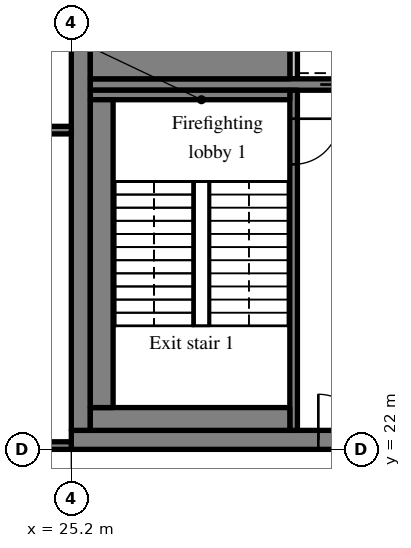
"""IFC4 building model, lengths in metres.
Left out: names, types, materials, properties, quantities, classifications, styles, units other than length and angle.
Written with IfcOpenShell. Run it as: python <this file> out.ifc"""

import sys

from ifc_helpers import new_model, si_unit, direction, frame, frame_2d, origin, place, context, subcontext, project, spatial, rectangle, extrude, source, transform, mapped, element, fill, save


model = new_model("IFC4")
c1 = context("Model", 3, precision=1e-05, world=origin(), true_north=direction((0.0, 1.0)))
c2 = subcontext(c1, "Body", "Model", "MODEL_VIEW")
j1 = project(units=[si_unit("LENGTHUNIT", "METRE"), si_unit("PLANEANGLEUNIT", "RADIAN")], contexts=[c1])
p1 = place(None, origin())
s1 = spatial("IfcSite", under=j1, at=p1, CompositionType="ELEMENT")
p2 = place(p1, origin())
s2 = spatial("IfcBuilding", under=s1, at=p2, CompositionType="ELEMENT")
p3 = place(p2, frame((0.0, 0.0, 309.7)))
s3 = spatial("IfcBuildingStorey", under=s2, at=p3, CompositionType="ELEMENT", Elevation=309.7)
m1 = source(origin(), c2, "Body", "SweptSolid", [
    extrude(rectangle(XDim=50.4, YDim=0.5, at=frame_2d((25.2, 0.0))), origin(), (0.0, 0.0, 1.0), 3.72),
])
p4 = place(p3, frame((25.2, 22.25, 0.0), z_axis=(0.0, 0.0, 1.0), x_axis=(1.0, 0.0, 0.0)))
e1 = element("IfcWall", 1, at=p4, inside=s3, PredefinedType="SHEAR", context=c2, shape_type="MappedRepresentation", body=[
    mapped(m1, transform((0.0, 0.0, 0.0), scale=1.0)),
])
m2 = source(origin(), c2, "Body", "SweptSolid", [
    extrude(rectangle(XDim=1.8, YDim=2.1, at=frame_2d((0.9, 1.05))), frame((0.0, 0.26, 0.0), z_axis=(0.0, -1.0, 0.0), x_axis=(1.0, 0.0, 0.0)), (0.0, 0.0, 1.0), 0.52),
])
p5 = place(p4, frame((15.9, 0.0, 0.0)))
e2 = element("IfcOpeningElement", 2, at=p5, cuts=e1, PredefinedType="OPENING", context=c2, shape_type="MappedRepresentation", body=[
    mapped(m2, transform((0.0, 0.0, 0.0), scale=1.0)),
])
m3 = source(origin(), c2, "Body", "SweptSolid", [
    extrude(rectangle(XDim=0.9, YDim=2.1, at=frame_2d((0.45, 1.05))), frame((0.0, 0.26, 0.0), z_axis=(0.0, -1.0, 0.0), x_axis=(1.0, 0.0, 0.0)), (0.0, 0.0, 1.0), 0.52),
])
p6 = place(p4, frame((11.175, 0.0, 0.0)))
e3 = element("IfcOpeningElement", 3, at=p6, cuts=e1, PredefinedType="OPENING", context=c2, shape_type="MappedRepresentation", body=[
    mapped(m3, transform((0.0, 0.0, 0.0), scale=1.0)),
])
p7 = place(p4, frame((21.525, 0.0, 0.0)))
e4 = element("IfcOpeningElement", 4, at=p7, cuts=e1, PredefinedType="OPENING", context=c2, shape_type="MappedRepresentation", body=[
    mapped(m3, transform((0.0, 0.0, 0.0), scale=1.0)),
])
p8 = place(p4, frame((32.7, 0.0, 0.0)))
e5 = element("IfcOpeningElement", 5, at=p8, cuts=e1, PredefinedType="OPENING", context=c2, shape_type="MappedRepresentation", body=[
    mapped(m2, transform((0.0, 0.0, 0.0), scale=1.0)),
])
m4 = source(origin(), c2, "Body", "SweptSolid", [
    extrude(rectangle(XDim=1.2, YDim=2.1, at=frame_2d((0.6, 1.05))), frame((0.0, 0.26, 0.0), z_axis=(0.0, -1.0, 0.0), x_axis=(1.0, 0.0, 0.0)), (0.0, 0.0, 1.0), 0.52),
])
p9 = place(p4, frame((6.5, 0.0, 0.0)))
e6 = element("IfcOpeningElement", 6, at=p9, cuts=e1, PredefinedType="OPENING", context=c2, shape_type="MappedRepresentation", body=[
    mapped(m4, transform((0.0, 0.0, 0.0), scale=1.0)),
])
p10 = place(p4, frame((47.975, 0.0, 0.0)))
e7 = element("IfcOpeningElement", 7, at=p10, cuts=e1, PredefinedType="OPENING", context=c2, shape_type="MappedRepresentation", body=[
    mapped(m4, transform((0.0, 0.0, 0.0), scale=1.0)),
])
m5 = source(origin(), c2, "Body", "SweptSolid", [
    extrude(rectangle(XDim=19.0, YDim=0.5, at=frame_2d((9.5, 0.0))), origin(), (0.0, 0.0, 1.0), 3.72),
])
p11 = place(p3, frame((25.45, 22.5, 0.0), z_axis=(0.0, 0.0, 1.0), x_axis=(0.0, 1.0, 0.0)))
e8 = element("IfcWall", 8, at=p11, inside=s3, PredefinedType="SHEAR", context=c2, shape_type="MappedRepresentation", body=[
    mapped(m5, transform((0.0, 0.0, 0.0), scale=1.0)),
])
m6 = source(origin(), c2, "Body", "SweptSolid", [
    extrude(rectangle(XDim=7.75, YDim=0.3, at=frame_2d((3.875, 0.0))), origin(), (0.0, 0.0, 1.0), 3.72),
])
p12 = place(p3, frame((25.7, 31.6, 0.0), z_axis=(0.0, 0.0, 1.0), x_axis=(1.0, 0.0, 0.0)))
e9 = element("IfcWall", 9, at=p12, inside=s3, PredefinedType="SHEAR", context=c2, shape_type="MappedRepresentation", body=[
    mapped(m6, transform((0.0, 0.0, 0.0), scale=1.0)),
])
m7 = source(origin(), c2, "Body", "SweptSolid", [
    extrude(rectangle(XDim=1.1, YDim=2.1, at=frame_2d((0.55, 1.05))), frame((0.0, 0.16, 0.0), z_axis=(0.0, -1.0, 0.0), x_axis=(1.0, 0.0, 0.0)), (0.0, 0.0, 1.0), 0.32),
])
p13 = place(p12, frame((6.05, 0.0, 0.0)))
e10 = element("IfcOpeningElement", 10, at=p13, cuts=e9, PredefinedType="OPENING", context=c2, shape_type="MappedRepresentation", body=[
    mapped(m7, transform((0.0, 0.0, 0.0), scale=1.0)),
])
m8 = source(origin(), c2, "Body", "SweptSolid", [
    extrude(rectangle(XDim=8.95, YDim=0.2, at=frame_2d((4.475, 0.0))), origin(), (0.0, 0.0, 1.0), 3.72),
])
p14 = place(p3, frame((31.05, 22.5, 0.0), z_axis=(0.0, 0.0, 1.0), x_axis=(0.0, 1.0, 0.0)))
e11 = element("IfcWall", 11, at=p14, inside=s3, PredefinedType="SOLIDWALL", context=c2, shape_type="MappedRepresentation", body=[
    mapped(m8, transform((0.0, 0.0, 0.0), scale=1.0)),
])
m9 = source(origin(), c2, "Body", "SweptSolid", [
    extrude(rectangle(XDim=1.2, YDim=2.1, at=frame_2d((0.6, 1.05))), frame((0.0, 0.11, 0.0), z_axis=(0.0, -1.0, 0.0), x_axis=(1.0, 0.0, 0.0)), (0.0, 0.0, 1.0), 0.22),
])
p15 = place(p14, frame((7.0, 0.0, 0.0)))
e12 = element("IfcOpeningElement", 12, at=p15, cuts=e11, PredefinedType="OPENING", context=c2, shape_type="MappedRepresentation", body=[
    mapped(m9, transform((0.0, 0.0, 0.0), scale=1.0)),
])
m10 = source(origin(), c2, "Body", "SweptSolid", [
    extrude(rectangle(XDim=1.85, YDim=0.2, at=frame_2d((0.925, 0.0))), origin(), (0.0, 0.0, 1.0), 3.72),
])
p16 = place(p3, frame((31.05, 31.75, 0.0), z_axis=(0.0, 0.0, 1.0), x_axis=(0.0, 1.0, 0.0)))
e13 = element("IfcWall", 13, at=p16, inside=s3, PredefinedType="SOLIDWALL", context=c2, shape_type="MappedRepresentation", body=[
    mapped(m10, transform((0.0, 0.0, 0.0), scale=1.0)),
])
m11 = source(origin(), c2, "Body", "SweptSolid", [
    extrude(rectangle(XDim=8.15, YDim=0.2, at=frame_2d((4.075, 0.0))), origin(), (0.0, 0.0, 1.0), 3.72),
])
p17 = place(p3, frame((17.05, 22.1, 0.0), z_axis=(0.0, 0.0, 1.0), x_axis=(1.0, 0.0, 0.0)))
e14 = element("IfcWall", 14, at=p17, inside=s3, PredefinedType="SOLIDWALL", context=c2, shape_type="MappedRepresentation", body=[
    mapped(m11, transform((0.0, 0.0, 0.0), scale=1.0)),
])
p18 = place(p17, frame((5.95, 0.0, 0.0)))
e15 = element("IfcOpeningElement", 15, at=p18, cuts=e14, PredefinedType="OPENING", context=c2, shape_type="MappedRepresentation", body=[
    mapped(m9, transform((0.0, 0.0, 0.0), scale=1.0)),
])
p19 = place(p3, frame((17.05, 30.4, 0.0), z_axis=(0.0, 0.0, 1.0), x_axis=(1.0, 0.0, 0.0)))
e16 = element("IfcWall", 16, at=p19, inside=s3, PredefinedType="SOLIDWALL", context=c2, shape_type="MappedRepresentation", body=[
    mapped(m11, transform((0.0, 0.0, 0.0), scale=1.0)),
])
m12 = source(origin(), c2, "Body", "SweptSolid", [
    extrude(rectangle(XDim=1.0, YDim=2.1, at=frame_2d((0.5, 1.05))), frame((0.0, 0.11, 0.0), z_axis=(0.0, -1.0, 0.0), x_axis=(1.0, 0.0, 0.0)), (0.0, 0.0, 1.0), 0.22),
])
p20 = place(p19, frame((6.05, 0.0, 0.0)))
e17 = element("IfcOpeningElement", 17, at=p20, cuts=e16, PredefinedType="OPENING", context=c2, shape_type="MappedRepresentation", body=[
    mapped(m12, transform((0.0, 0.0, 0.0), scale=1.0)),
])
m13 = source(origin(), c2, "Body", "SweptSolid", [
    extrude(rectangle(XDim=5.25, YDim=0.6, at=frame_2d((2.625, 0.0))), origin(), (0.0, 0.0, 1.0), 3.72),
])
p21 = place(p3, frame((25.7, 22.8, 0.0), z_axis=(0.0, 0.0, 1.0), x_axis=(1.0, 0.0, 0.0)))
e18 = element("IfcWall", 18, at=p21, inside=s3, PredefinedType="SOLIDWALL", context=c2, shape_type="MappedRepresentation", body=[
    mapped(m13, transform((0.0, 0.0, 0.0), scale=1.0)),
])
m14 = source(origin(), c2, "Body", "SweptSolid", [
    extrude(rectangle(XDim=5.25, YDim=0.25, at=frame_2d((2.625, 0.0))), origin(), (0.0, 0.0, 1.0), 3.72),
])
p22 = place(p3, frame((25.7, 31.325, 0.0), z_axis=(0.0, 0.0, 1.0), x_axis=(1.0, 0.0, 0.0)))
e19 = element("IfcWall", 19, at=p22, inside=s3, PredefinedType="SOLIDWALL", context=c2, shape_type="MappedRepresentation", body=[
    mapped(m14, transform((0.0, 0.0, 0.0), scale=1.0)),
])
m15 = source(origin(), c2, "Body", "SweptSolid", [
    extrude(rectangle(XDim=8.1, YDim=0.6, at=frame_2d((4.05, 0.0))), origin(), (0.0, 0.0, 1.0), 3.72),
])
p23 = place(p3, frame((26.0, 23.1, 0.0), z_axis=(0.0, 0.0, 1.0), x_axis=(0.0, 1.0, 0.0)))
e20 = element("IfcWall", 20, at=p23, inside=s3, PredefinedType="SOLIDWALL", context=c2, shape_type="MappedRepresentation", body=[
    mapped(m15, transform((0.0, 0.0, 0.0), scale=1.0)),
])
m16 = source(origin(), c2, "Body", "SweptSolid", [
    extrude(rectangle(XDim=5.25, YDim=1.05, at=frame_2d((2.625, 0.0))), origin(), (0.0, 0.0, 1.0), 3.72),
])
p24 = place(p3, frame((25.7, 32.275, 0.0), z_axis=(0.0, 0.0, 1.0), x_axis=(1.0, 0.0, 0.0)))
e21 = element("IfcWall", 21, at=p24, inside=s3, PredefinedType="SOLIDWALL", context=c2, shape_type="MappedRepresentation", body=[
    mapped(m16, transform((0.0, 0.0, 0.0), scale=1.0)),
])
m17 = source(origin(), c2, "Body", "SweptSolid", [
    extrude(rectangle(XDim=1.2, YDim=2.1, at=frame_2d((0.6, 1.05))), frame((0.0, 0.025, 0.0), z_axis=(0.0, -1.0, 0.0), x_axis=(1.0, 0.0, 0.0)), (0.0, 0.0, 1.0), 0.05),
])
p25 = place(p15, origin())
e22 = element("IfcDoor", 22, at=p25, inside=s3, OperationType="SINGLE_SWING_RIGHT", PredefinedType="DOOR", context=c2, shape_type="MappedRepresentation", body=[
    mapped(m17, transform((0.0, 0.0, 0.0), scale=1.0)),
])
fill(e12, e22)
m18 = source(origin(), c2, "Body", "SweptSolid", [
    extrude(rectangle(XDim=1.2, YDim=2.1, at=frame_2d((0.6, 1.05))), frame((0.0, 0.175, 0.0), z_axis=(0.0, -1.0, 0.0), x_axis=(1.0, 0.0, 0.0)), (0.0, 0.0, 1.0), 0.05),
])
p26 = place(p9, origin())
e23 = element("IfcDoor", 23, at=p26, inside=s3, OperationType="SINGLE_SWING_LEFT", PredefinedType="DOOR", context=c2, shape_type="MappedRepresentation", body=[
    mapped(m18, transform((0.0, 0.0, 0.0), scale=1.0)),
])
fill(e6, e23)
m19 = source(origin(), c2, "Body", "SweptSolid", [
    extrude(rectangle(XDim=1.1, YDim=2.1, at=frame_2d((0.55, 1.05))), frame((0.0, 0.025, 0.0), z_axis=(0.0, -1.0, 0.0), x_axis=(1.0, 0.0, 0.0)), (0.0, 0.0, 1.0), 0.05),
])
p27 = place(p13, origin())
e24 = element("IfcDoor", 24, at=p27, inside=s3, OperationType="SLIDING_TO_LEFT", PredefinedType="DOOR", context=c2, shape_type="MappedRepresentation", body=[
    mapped(m19, transform((0.0, 0.0, 0.0), scale=1.0)),
])
fill(e10, e24)
save(model, sys.argv[1])
